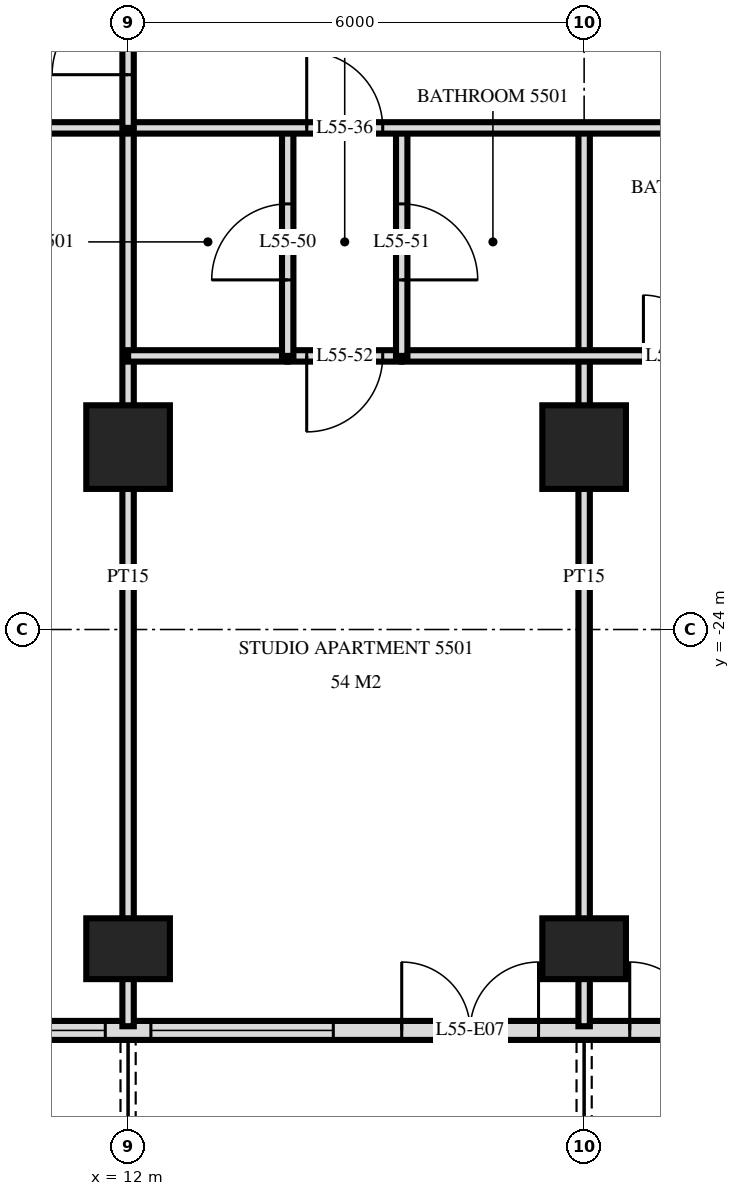
"""IFC4 building model, lengths in metres.
Left out: names, types, materials, properties, quantities, classifications, styles, units other than length and angle.
Written with IfcOpenShell. Run it as: python <this file> out.ifc"""

import sys

from ifc_helpers import new_model, si_unit, direction, frame, frame_2d, origin, origin_2d, place, context, subcontext, project, spatial, rectangle, extrude, element, fill, save


model = new_model("IFC4")
c1 = context("Model", 3, precision=1e-05, world=origin(), true_north=direction((0.0, 1.0)))
c2 = subcontext(c1, "Body", "Model", "MODEL_VIEW")
j1 = project(units=[si_unit("LENGTHUNIT", "METRE"), si_unit("PLANEANGLEUNIT", "RADIAN")], contexts=[c1])
p1 = place(None, origin())
s1 = spatial("IfcSite", under=j1, at=p1, CompositionType="ELEMENT")
p2 = place(p1, origin())
s2 = spatial("IfcBuilding", under=s1, at=p2, CompositionType="ELEMENT")
p3 = place(p2, frame((0.0, 0.0, 211.6)))
s3 = spatial("IfcBuildingStorey", under=s2, at=p3, CompositionType="ELEMENT", Elevation=211.6)
p4 = place(p3, frame((12.0, -28.2, 0.0), z_axis=(0.0, 0.0, 1.0), x_axis=(1.0, 0.0, 0.0)))
e1 = element("IfcColumn", 1, at=p4, inside=s3, PredefinedType="COLUMN", context=c2, shape_type="SweptSolid", body=[
    extrude(rectangle(XDim=1.1, YDim=0.8, at=origin_2d()), origin(), (0.0, 0.0, 1.0), 3.5),
])
p5 = place(p3, frame((12.0, -21.6, 0.0), z_axis=(0.0, 0.0, 1.0), x_axis=(1.0, 0.0, 0.0)))
e2 = element("IfcColumn", 2, at=p5, inside=s3, PredefinedType="COLUMN", context=c2, shape_type="SweptSolid", body=[
    extrude(rectangle(XDim=1.1, YDim=1.1, at=origin_2d()), origin(), (0.0, 0.0, 1.0), 3.5),
])
p6 = place(p3, frame((18.0, -28.2, 0.0), z_axis=(0.0, 0.0, 1.0), x_axis=(1.0, 0.0, 0.0)))
e3 = element("IfcColumn", 3, at=p6, inside=s3, PredefinedType="COLUMN", context=c2, shape_type="SweptSolid", body=[
    extrude(rectangle(XDim=1.1, YDim=0.8, at=origin_2d()), origin(), (0.0, 0.0, 1.0), 3.5),
])
p7 = place(p3, frame((18.0, -21.6, 0.0), z_axis=(0.0, 0.0, 1.0), x_axis=(1.0, 0.0, 0.0)))
e4 = element("IfcColumn", 4, at=p7, inside=s3, PredefinedType="COLUMN", context=c2, shape_type="SweptSolid", body=[
    extrude(rectangle(XDim=1.1, YDim=1.1, at=origin_2d()), origin(), (0.0, 0.0, 1.0), 3.5),
])
p8 = place(p3, frame((-22.475, -29.275, 0.0), z_axis=(0.0, 0.0, 1.0), x_axis=(1.0, 0.0, 0.0)))
e5 = element("IfcWall", 5, at=p8, inside=s3, PredefinedType="SOLIDWALL", context=c2, shape_type="SweptSolid", body=[
    extrude(rectangle(XDim=44.951, YDim=0.25, at=frame_2d((22.475, 0.0))), origin(), (0.0, 0.0, 1.0), 3.22),
])
p9 = place(p8, frame((0.575, 0.0, 0.0)))
e6 = element("IfcOpeningElement", 6, at=p9, cuts=e5, PredefinedType="OPENING", context=c2, shape_type="SweptSolid", body=[
    extrude(rectangle(XDim=1.8, YDim=2.4, at=frame_2d((0.9, 1.2))), frame((0.0, 0.135, 0.0), z_axis=(0.0, -1.0, 0.0), x_axis=(1.0, 0.0, 0.0)), (0.0, 0.0, 1.0), 0.27),
])
p10 = place(p8, frame((6.2, 0.0, 0.0)))
e7 = element("IfcOpeningElement", 7, at=p10, cuts=e5, PredefinedType="OPENING", context=c2, shape_type="SweptSolid", body=[
    extrude(rectangle(XDim=1.8, YDim=2.4, at=frame_2d((0.9, 1.2))), frame((0.0, 0.135, 0.0), z_axis=(0.0, -1.0, 0.0), x_axis=(1.0, 0.0, 0.0)), (0.0, 0.0, 1.0), 0.27),
])
p11 = place(p8, frame((8.45, 0.0, 0.9)))
e8 = element("IfcOpeningElement", 8, at=p11, cuts=e5, PredefinedType="OPENING", context=c2, shape_type="SweptSolid", body=[
    extrude(rectangle(XDim=1.8, YDim=1.5, at=frame_2d((0.9, 0.75))), frame((0.0, 0.135, 0.0), z_axis=(0.0, -1.0, 0.0), x_axis=(1.0, 0.0, 0.0)), (0.0, 0.0, 1.0), 0.27),
])
p12 = place(p8, frame((11.075, 0.0, 0.0)))
e9 = element("IfcOpeningElement", 9, at=p12, cuts=e5, PredefinedType="OPENING", context=c2, shape_type="SweptSolid", body=[
    extrude(rectangle(XDim=1.8, YDim=2.4, at=frame_2d((0.9, 1.2))), frame((0.0, 0.135, 0.0), z_axis=(0.0, -1.0, 0.0), x_axis=(1.0, 0.0, 0.0)), (0.0, 0.0, 1.0), 0.27),
])
p13 = place(p8, frame((13.775, 0.0, 0.9)))
e10 = element("IfcOpeningElement", 10, at=p13, cuts=e5, PredefinedType="OPENING", context=c2, shape_type="SweptSolid", body=[
    extrude(rectangle(XDim=2.4, YDim=1.5, at=frame_2d((1.2, 0.75))), frame((0.0, 0.135, 0.0), z_axis=(0.0, -1.0, 0.0), x_axis=(1.0, 0.0, 0.0)), (0.0, 0.0, 1.0), 0.27),
])
p14 = place(p8, frame((16.775, 0.0, 0.9)))
e11 = element("IfcOpeningElement", 11, at=p14, cuts=e5, PredefinedType="OPENING", context=c2, shape_type="SweptSolid", body=[
    extrude(rectangle(XDim=2.4, YDim=1.5, at=frame_2d((1.2, 0.75))), frame((0.0, 0.135, 0.0), z_axis=(0.0, -1.0, 0.0), x_axis=(1.0, 0.0, 0.0)), (0.0, 0.0, 1.0), 0.27),
])
p15 = place(p8, frame((20.075, 0.0, 0.0)))
e12 = element("IfcOpeningElement", 12, at=p15, cuts=e5, PredefinedType="OPENING", context=c2, shape_type="SweptSolid", body=[
    extrude(rectangle(XDim=1.8, YDim=2.4, at=frame_2d((0.9, 1.2))), frame((0.0, 0.135, 0.0), z_axis=(0.0, -1.0, 0.0), x_axis=(1.0, 0.0, 0.0)), (0.0, 0.0, 1.0), 0.27),
])
p16 = place(p8, frame((23.075, 0.0, 0.0)))
e13 = element("IfcOpeningElement", 13, at=p16, cuts=e5, PredefinedType="OPENING", context=c2, shape_type="SweptSolid", body=[
    extrude(rectangle(XDim=1.8, YDim=2.4, at=frame_2d((0.9, 1.2))), frame((0.0, 0.135, 0.0), z_axis=(0.0, -1.0, 0.0), x_axis=(1.0, 0.0, 0.0)), (0.0, 0.0, 1.0), 0.27),
])
p17 = place(p8, frame((25.775, 0.0, 0.9)))
e14 = element("IfcOpeningElement", 14, at=p17, cuts=e5, PredefinedType="OPENING", context=c2, shape_type="SweptSolid", body=[
    extrude(rectangle(XDim=2.4, YDim=1.5, at=frame_2d((1.2, 0.75))), frame((0.0, 0.135, 0.0), z_axis=(0.0, -1.0, 0.0), x_axis=(1.0, 0.0, 0.0)), (0.0, 0.0, 1.0), 0.27),
])
p18 = place(p8, frame((29.075, 0.0, 0.0)))
e15 = element("IfcOpeningElement", 15, at=p18, cuts=e5, PredefinedType="OPENING", context=c2, shape_type="SweptSolid", body=[
    extrude(rectangle(XDim=1.8, YDim=2.4, at=frame_2d((0.9, 1.2))), frame((0.0, 0.135, 0.0), z_axis=(0.0, -1.0, 0.0), x_axis=(1.0, 0.0, 0.0)), (0.0, 0.0, 1.0), 0.27),
])
p19 = place(p8, frame((31.775, 0.0, 0.9)))
e16 = element("IfcOpeningElement", 16, at=p19, cuts=e5, PredefinedType="OPENING", context=c2, shape_type="SweptSolid", body=[
    extrude(rectangle(XDim=2.4, YDim=1.5, at=frame_2d((1.2, 0.75))), frame((0.0, 0.135, 0.0), z_axis=(0.0, -1.0, 0.0), x_axis=(1.0, 0.0, 0.0)), (0.0, 0.0, 1.0), 0.27),
])
p20 = place(p8, frame((34.775, 0.0, 0.9)))
e17 = element("IfcOpeningElement", 17, at=p20, cuts=e5, PredefinedType="OPENING", context=c2, shape_type="SweptSolid", body=[
    extrude(rectangle(XDim=2.4, YDim=1.5, at=frame_2d((1.2, 0.75))), frame((0.0, 0.135, 0.0), z_axis=(0.0, -1.0, 0.0), x_axis=(1.0, 0.0, 0.0)), (0.0, 0.0, 1.0), 0.27),
])
p21 = place(p8, frame((38.075, 0.0, 0.0)))
e18 = element("IfcOpeningElement", 18, at=p21, cuts=e5, PredefinedType="OPENING", context=c2, shape_type="SweptSolid", body=[
    extrude(rectangle(XDim=1.8, YDim=2.4, at=frame_2d((0.9, 1.2))), frame((0.0, 0.135, 0.0), z_axis=(0.0, -1.0, 0.0), x_axis=(1.0, 0.0, 0.0)), (0.0, 0.0, 1.0), 0.27),
])
p22 = place(p8, frame((41.075, 0.0, 0.0)))
e19 = element("IfcOpeningElement", 19, at=p22, cuts=e5, PredefinedType="OPENING", context=c2, shape_type="SweptSolid", body=[
    extrude(rectangle(XDim=1.8, YDim=2.4, at=frame_2d((0.9, 1.2))), frame((0.0, 0.135, 0.0), z_axis=(0.0, -1.0, 0.0), x_axis=(1.0, 0.0, 0.0)), (0.0, 0.0, 1.0), 0.27),
])
p23 = place(p3, frame((18.0, -29.22, 0.0), z_axis=(0.0, 0.0, 1.0), x_axis=(0.0, 1.0, 0.0)))
e20 = element("IfcWall", 20, at=p23, inside=s3, PredefinedType="PARTITIONING", context=c2, shape_type="SweptSolid", body=[
    extrude(rectangle(XDim=11.82, YDim=0.15, at=frame_2d((5.91, 0.0))), origin(), (0.0, 0.0, 1.0), 3.22),
])
p24 = place(p3, frame((15.6, -20.4, 0.0), z_axis=(0.0, 0.0, 1.0), x_axis=(0.0, 1.0, 0.0)))
e21 = element("IfcWall", 21, at=p24, inside=s3, PredefinedType="PARTITIONING", context=c2, shape_type="SweptSolid", body=[
    extrude(rectangle(XDim=3.0, YDim=0.15, at=frame_2d((1.5, 0.0))), origin(), (0.0, 0.0, 1.0), 3.22),
])
p25 = place(p24, frame((1.0, 0.0, 0.0)))
e22 = element("IfcOpeningElement", 22, at=p25, cuts=e21, PredefinedType="OPENING", context=c2, shape_type="SweptSolid", body=[
    extrude(rectangle(XDim=1.0, YDim=2.1, at=frame_2d((0.5, 1.05))), frame((0.0, 0.085, 0.0), z_axis=(0.0, -1.0, 0.0), x_axis=(1.0, 0.0, 0.0)), (0.0, 0.0, 1.0), 0.17),
])
p26 = place(p3, frame((14.1, -20.4, 0.0), z_axis=(0.0, 0.0, 1.0), x_axis=(0.0, 1.0, 0.0)))
e23 = element("IfcWall", 23, at=p26, inside=s3, PredefinedType="PARTITIONING", context=c2, shape_type="SweptSolid", body=[
    extrude(rectangle(XDim=3.0, YDim=0.15, at=frame_2d((1.5, 0.0))), origin(), (0.0, 0.0, 1.0), 3.22),
])
p27 = place(p26, frame((1.0, 0.0, 0.0)))
e24 = element("IfcOpeningElement", 24, at=p27, cuts=e23, PredefinedType="OPENING", context=c2, shape_type="SweptSolid", body=[
    extrude(rectangle(XDim=1.0, YDim=2.1, at=frame_2d((0.5, 1.05))), frame((0.0, 0.085, 0.0), z_axis=(0.0, -1.0, 0.0), x_axis=(1.0, 0.0, 0.0)), (0.0, 0.0, 1.0), 0.17),
])
p28 = place(p3, frame((12.0, -17.4, 0.0), z_axis=(0.0, 0.0, 1.0), x_axis=(0.0, 1.0, 0.0)))
e25 = element("IfcWall", 25, at=p28, inside=s3, PredefinedType="PARTITIONING", context=c2, shape_type="SweptSolid", body=[
    extrude(rectangle(XDim=2.35, YDim=0.15, at=frame_2d((1.175, 0.0))), origin(), (0.0, 0.0, 1.0), 3.22),
])
p29 = place(p28, frame((0.7, 0.0, 0.0)))
e26 = element("IfcOpeningElement", 26, at=p29, cuts=e25, PredefinedType="OPENING", context=c2, shape_type="SweptSolid", body=[
    extrude(rectangle(XDim=1.0, YDim=2.1, at=frame_2d((0.5, 1.05))), frame((0.0, 0.085, 0.0), z_axis=(0.0, -1.0, 0.0), x_axis=(1.0, 0.0, 0.0)), (0.0, 0.0, 1.0), 0.17),
])
p30 = place(p3, frame((12.0, -29.22, 0.0), z_axis=(0.0, 0.0, 1.0), x_axis=(0.0, 1.0, 0.0)))
e27 = element("IfcWall", 27, at=p30, inside=s3, PredefinedType="PARTITIONING", context=c2, shape_type="SweptSolid", body=[
    extrude(rectangle(XDim=11.82, YDim=0.15, at=frame_2d((5.91, 0.0))), origin(), (0.0, 0.0, 1.0), 3.22),
])
p31 = place(p3, frame((14.1, -20.4, 0.0), z_axis=(0.0, 0.0, 1.0), x_axis=(1.0, 0.0, 0.0)))
e28 = element("IfcWall", 28, at=p31, inside=s3, PredefinedType="PARTITIONING", context=c2, shape_type="SweptSolid", body=[
    extrude(rectangle(XDim=1.5, YDim=0.15, at=frame_2d((0.75, 0.0))), origin(), (0.0, 0.0, 1.0), 3.22),
])
p32 = place(p31, frame((0.25, 0.0, 0.0)))
e29 = element("IfcOpeningElement", 29, at=p32, cuts=e28, PredefinedType="OPENING", context=c2, shape_type="SweptSolid", body=[
    extrude(rectangle(XDim=1.0, YDim=2.1, at=frame_2d((0.5, 1.05))), frame((0.0, 0.085, 0.0), z_axis=(0.0, -1.0, 0.0), x_axis=(1.0, 0.0, 0.0)), (0.0, 0.0, 1.0), 0.17),
])
p33 = place(p3, frame((12.0, -20.4, 0.0), z_axis=(0.0, 0.0, 1.0), x_axis=(1.0, 0.0, 0.0)))
e30 = element("IfcWall", 30, at=p33, inside=s3, PredefinedType="PARTITIONING", context=c2, shape_type="SweptSolid", body=[
    extrude(rectangle(XDim=2.1, YDim=0.15, at=frame_2d((1.05, 0.0))), origin(), (0.0, 0.0, 1.0), 3.22),
])
p34 = place(p3, frame((15.6, -20.4, 0.0), z_axis=(0.0, 0.0, 1.0), x_axis=(1.0, 0.0, 0.0)))
e31 = element("IfcWall", 31, at=p34, inside=s3, PredefinedType="PARTITIONING", context=c2, shape_type="SweptSolid", body=[
    extrude(rectangle(XDim=6.6, YDim=0.15, at=frame_2d((3.3, 0.0))), origin(), (0.0, 0.0, 1.0), 3.22),
])
p35 = place(p34, frame((3.18, 0.0, 0.0)))
e32 = element("IfcOpeningElement", 32, at=p35, cuts=e31, PredefinedType="OPENING", context=c2, shape_type="SweptSolid", body=[
    extrude(rectangle(XDim=0.8, YDim=2.1, at=frame_2d((0.4, 1.05))), frame((0.0, 0.085, 0.0), z_axis=(0.0, -1.0, 0.0), x_axis=(1.0, 0.0, 0.0)), (0.0, 0.0, 1.0), 0.17),
])
p36 = place(p3, frame((-26.82, -17.4, 0.0), z_axis=(0.0, 0.0, 1.0), x_axis=(1.0, 0.0, 0.0)))
e33 = element("IfcWall", 33, at=p36, inside=s3, PredefinedType="PARTITIONING", context=c2, shape_type="SweptSolid", body=[
    extrude(rectangle(XDim=53.64, YDim=0.15, at=frame_2d((26.82, 0.0))), origin(), (0.0, 0.0, 1.0), 3.22),
])
p37 = place(p36, frame((4.92, 0.0, 0.0)))
e34 = element("IfcOpeningElement", 34, at=p37, cuts=e33, PredefinedType="OPENING", context=c2, shape_type="SweptSolid", body=[
    extrude(rectangle(XDim=1.0, YDim=2.1, at=frame_2d((0.5, 1.05))), frame((0.0, 0.085, 0.0), z_axis=(0.0, -1.0, 0.0), x_axis=(1.0, 0.0, 0.0)), (0.0, 0.0, 1.0), 0.17),
])
p38 = place(p36, frame((1.62, 0.0, 0.0)))
e35 = element("IfcOpeningElement", 35, at=p38, cuts=e33, PredefinedType="OPENING", context=c2, shape_type="SweptSolid", body=[
    extrude(rectangle(XDim=1.0, YDim=2.1, at=frame_2d((0.5, 1.05))), frame((0.0, 0.085, 0.0), z_axis=(0.0, -1.0, 0.0), x_axis=(1.0, 0.0, 0.0)), (0.0, 0.0, 1.0), 0.17),
])
p39 = place(p36, frame((41.17, 0.0, 0.0)))
e36 = element("IfcOpeningElement", 36, at=p39, cuts=e33, PredefinedType="OPENING", context=c2, shape_type="SweptSolid", body=[
    extrude(rectangle(XDim=1.0, YDim=2.1, at=frame_2d((0.5, 1.05))), frame((0.0, 0.085, 0.0), z_axis=(0.0, -1.0, 0.0), x_axis=(1.0, 0.0, 0.0)), (0.0, 0.0, 1.0), 0.17),
])
p40 = place(p36, frame((49.42, 0.0, 0.0)))
e37 = element("IfcOpeningElement", 37, at=p40, cuts=e33, PredefinedType="OPENING", context=c2, shape_type="SweptSolid", body=[
    extrude(rectangle(XDim=1.0, YDim=2.1, at=frame_2d((0.5, 1.05))), frame((0.0, 0.085, 0.0), z_axis=(0.0, -1.0, 0.0), x_axis=(1.0, 0.0, 0.0)), (0.0, 0.0, 1.0), 0.17),
])
p41 = place(p36, frame((47.62, 0.0, 0.0)))
e38 = element("IfcOpeningElement", 38, at=p41, cuts=e33, PredefinedType="OPENING", context=c2, shape_type="SweptSolid", body=[
    extrude(rectangle(XDim=1.0, YDim=2.1, at=frame_2d((0.5, 1.05))), frame((0.0, 0.085, 0.0), z_axis=(0.0, -1.0, 0.0), x_axis=(1.0, 0.0, 0.0)), (0.0, 0.0, 1.0), 0.17),
])
p42 = place(p36, frame((21.82, 0.0, 0.0)))
e39 = element("IfcOpeningElement", 39, at=p42, cuts=e33, PredefinedType="OPENING", context=c2, shape_type="SweptSolid", body=[
    extrude(rectangle(XDim=1.0, YDim=2.1, at=frame_2d((0.5, 1.05))), frame((0.0, 0.085, 0.0), z_axis=(0.0, -1.0, 0.0), x_axis=(1.0, 0.0, 0.0)), (0.0, 0.0, 1.0), 0.17),
])
p43 = place(p36, frame((33.82, 0.0, 0.0)))
e40 = element("IfcOpeningElement", 40, at=p43, cuts=e33, PredefinedType="OPENING", context=c2, shape_type="SweptSolid", body=[
    extrude(rectangle(XDim=1.0, YDim=2.1, at=frame_2d((0.5, 1.05))), frame((0.0, 0.085, 0.0), z_axis=(0.0, -1.0, 0.0), x_axis=(1.0, 0.0, 0.0)), (0.0, 0.0, 1.0), 0.17),
])
p44 = place(p19, origin())
e41 = element("IfcWindow", 41, at=p44, inside=s3, PartitioningType="SINGLE_PANEL", PredefinedType="WINDOW", context=c2, shape_type="SweptSolid", body=[
    extrude(rectangle(XDim=2.4, YDim=1.5, at=frame_2d((1.2, 0.75))), frame((0.0, 0.03, 0.0), z_axis=(0.0, -1.0, 0.0), x_axis=(1.0, 0.0, 0.0)), (0.0, 0.0, 1.0), 0.06),
])
fill(e16, e41)
p45 = place(p20, origin())
e42 = element("IfcWindow", 42, at=p45, inside=s3, PartitioningType="SINGLE_PANEL", PredefinedType="WINDOW", context=c2, shape_type="SweptSolid", body=[
    extrude(rectangle(XDim=2.4, YDim=1.5, at=frame_2d((1.2, 0.75))), frame((0.0, 0.03, 0.0), z_axis=(0.0, -1.0, 0.0), x_axis=(1.0, 0.0, 0.0)), (0.0, 0.0, 1.0), 0.06),
])
fill(e17, e42)
p46 = place(p21, origin())
e43 = element("IfcDoor", 43, at=p46, inside=s3, OperationType="DOUBLE_DOOR_SINGLE_SWING", PredefinedType="DOOR", context=c2, shape_type="SweptSolid", body=[
    extrude(rectangle(XDim=1.8, YDim=2.4, at=frame_2d((0.9, 1.2))), frame((0.0, 0.025, 0.0), z_axis=(0.0, -1.0, 0.0), x_axis=(1.0, 0.0, 0.0)), (0.0, 0.0, 1.0), 0.05),
])
fill(e18, e43)
p47 = place(p22, origin())
e44 = element("IfcDoor", 44, at=p47, inside=s3, OperationType="DOUBLE_DOOR_SINGLE_SWING", PredefinedType="DOOR", context=c2, shape_type="SweptSolid", body=[
    extrude(rectangle(XDim=1.8, YDim=2.4, at=frame_2d((0.9, 1.2))), frame((0.0, 0.025, 0.0), z_axis=(0.0, -1.0, 0.0), x_axis=(1.0, 0.0, 0.0)), (0.0, 0.0, 1.0), 0.05),
])
fill(e19, e44)
p48 = place(p29, origin())
e45 = element("IfcDoor", 45, at=p48, inside=s3, OperationType="SINGLE_SWING_RIGHT", PredefinedType="DOOR", context=c2, shape_type="SweptSolid", body=[
    extrude(rectangle(XDim=1.0, YDim=2.1, at=frame_2d((0.5, 1.05))), frame((0.0, 0.025, 0.0), z_axis=(0.0, -1.0, 0.0), x_axis=(1.0, 0.0, 0.0)), (0.0, 0.0, 1.0), 0.05),
])
fill(e26, e45)
p49 = place(p39, origin())
e46 = element("IfcDoor", 46, at=p49, inside=s3, OperationType="SINGLE_SWING_RIGHT", PredefinedType="DOOR", context=c2, shape_type="SweptSolid", body=[
    extrude(rectangle(XDim=1.0, YDim=2.1, at=frame_2d((0.5, 1.05))), frame((0.0, 0.025, 0.0), z_axis=(0.0, -1.0, 0.0), x_axis=(1.0, 0.0, 0.0)), (0.0, 0.0, 1.0), 0.05),
])
fill(e36, e46)
p50 = place(p27, origin())
e47 = element("IfcDoor", 47, at=p50, inside=s3, OperationType="SINGLE_SWING_RIGHT", PredefinedType="DOOR", context=c2, shape_type="SweptSolid", body=[
    extrude(rectangle(XDim=1.0, YDim=2.1, at=frame_2d((0.5, 1.05))), frame((0.0, 0.025, 0.0), z_axis=(0.0, -1.0, 0.0), x_axis=(1.0, 0.0, 0.0)), (0.0, 0.0, 1.0), 0.05),
])
fill(e24, e47)
p51 = place(p25, frame((0.5, 0.0, 0.0), z_axis=(0.0, 0.0, 1.0), x_axis=(-1.0, 0.0, 0.0)))
e48 = element("IfcDoor", 48, at=p51, inside=s3, OperationType="SINGLE_SWING_LEFT", PredefinedType="DOOR", context=c2, shape_type="SweptSolid", body=[
    extrude(rectangle(XDim=1.0, YDim=2.1, at=frame_2d((0.0, 1.05))), frame((0.0, -0.025, 0.0), z_axis=(0.0, 1.0, 0.0), x_axis=(-1.0, 0.0, 0.0)), (0.0, 0.0, 1.0), 0.05),
])
fill(e22, e48)
p52 = place(p32, frame((0.5, 0.0, 0.0), z_axis=(0.0, 0.0, 1.0), x_axis=(-1.0, 0.0, 0.0)))
e49 = element("IfcDoor", 49, at=p52, inside=s3, OperationType="SINGLE_SWING_LEFT", PredefinedType="DOOR", context=c2, shape_type="SweptSolid", body=[
    extrude(rectangle(XDim=1.0, YDim=2.1, at=frame_2d((0.0, 1.05))), frame((0.0, -0.025, 0.0), z_axis=(0.0, 1.0, 0.0), x_axis=(-1.0, 0.0, 0.0)), (0.0, 0.0, 1.0), 0.05),
])
fill(e29, e49)
p53 = place(p35, origin())
e50 = element("IfcDoor", 50, at=p53, inside=s3, OperationType="SINGLE_SWING_RIGHT", PredefinedType="DOOR", context=c2, shape_type="SweptSolid", body=[
    extrude(rectangle(XDim=0.8, YDim=2.1, at=frame_2d((0.4, 1.05))), frame((0.0, 0.025, 0.0), z_axis=(0.0, -1.0, 0.0), x_axis=(1.0, 0.0, 0.0)), (0.0, 0.0, 1.0), 0.05),
])
fill(e32, e50)
save(model, sys.argv[1])
